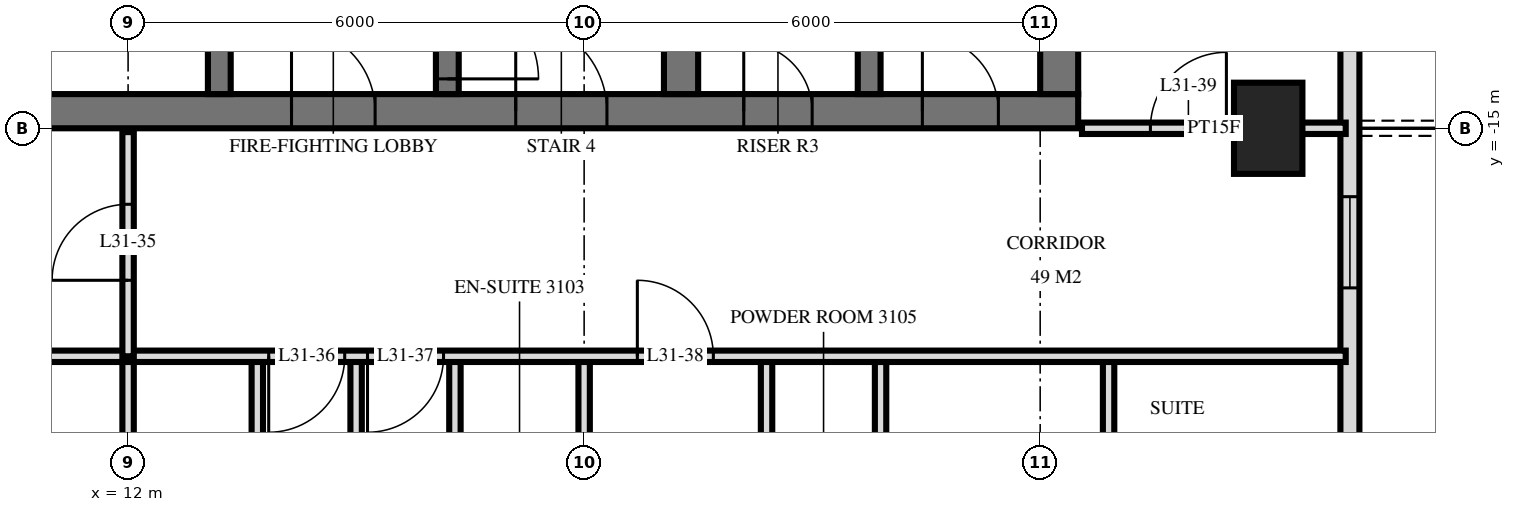
"""IFC4 building model, lengths in metres.
Left out: names, types, materials, properties, quantities, classifications, styles, units other than length and angle.
Written with IfcOpenShell. Run it as: python <this file> out.ifc"""

import sys

from ifc_helpers import new_model, si_unit, direction, frame, frame_2d, origin, origin_2d, place, context, subcontext, project, spatial, rectangle, extrude, element, fill, save


model = new_model("IFC4")
c1 = context("Model", 3, precision=1e-05, world=origin(), true_north=direction((0.0, 1.0)))
c2 = subcontext(c1, "Body", "Model", "MODEL_VIEW")
j1 = project(units=[si_unit("LENGTHUNIT", "METRE"), si_unit("PLANEANGLEUNIT", "RADIAN")], contexts=[c1])
p1 = place(None, origin())
s1 = spatial("IfcSite", under=j1, at=p1, CompositionType="ELEMENT")
p2 = place(p1, origin())
s2 = spatial("IfcBuilding", under=s1, at=p2, CompositionType="ELEMENT")
p3 = place(p2, frame((0.0, 0.0, 123.6)))
s3 = spatial("IfcBuildingStorey", under=s2, at=p3, CompositionType="ELEMENT", Elevation=123.6)
p4 = place(p3, frame((27.0, -15.0, 0.0), z_axis=(0.0, 0.0, 1.0), x_axis=(0.0, 1.0, 0.0)))
e1 = element("IfcColumn", 1, at=p4, inside=s3, PredefinedType="COLUMN", context=c2, shape_type="SweptSolid", body=[
    extrude(rectangle(XDim=1.2, YDim=0.9, at=origin_2d()), origin(), (0.0, 0.0, 1.0), 3.6),
])
p5 = place(p3, frame((10.0, -14.775, 0.0), z_axis=(0.0, 0.0, 1.0), x_axis=(1.0, 0.0, 0.0)))
e2 = element("IfcWall", 2, at=p5, inside=s3, PredefinedType="SHEAR", context=c2, shape_type="SweptSolid", body=[
    extrude(rectangle(XDim=14.5, YDim=0.45, at=frame_2d((7.25, 0.0))), origin(), (0.0, 0.0, 1.0), 3.6),
])
p6 = place(p5, frame((7.1, 0.0, 0.0)))
e3 = element("IfcOpeningElement", 3, at=p6, cuts=e2, PredefinedType="OPENING", context=c2, shape_type="SweptSolid", body=[
    extrude(rectangle(XDim=1.2, YDim=2.1, at=frame_2d((0.6, 1.05))), frame((0.0, 0.235, 0.0), z_axis=(0.0, -1.0, 0.0), x_axis=(1.0, 0.0, 0.0)), (0.0, 0.0, 1.0), 0.47),
])
p7 = place(p5, frame((4.15, 0.0, 0.0)))
e4 = element("IfcOpeningElement", 4, at=p7, cuts=e2, PredefinedType="OPENING", context=c2, shape_type="SweptSolid", body=[
    extrude(rectangle(XDim=1.1, YDim=2.1, at=frame_2d((0.55, 1.05))), frame((0.0, 0.235, 0.0), z_axis=(0.0, -1.0, 0.0), x_axis=(1.0, 0.0, 0.0)), (0.0, 0.0, 1.0), 0.47),
])
p8 = place(p5, frame((10.1, 0.0, 0.0)))
e5 = element("IfcOpeningElement", 5, at=p8, cuts=e2, PredefinedType="OPENING", context=c2, shape_type="SweptSolid", body=[
    extrude(rectangle(XDim=0.9, YDim=2.1, at=frame_2d((0.45, 1.05))), frame((0.0, 0.235, 0.0), z_axis=(0.0, -1.0, 0.0), x_axis=(1.0, 0.0, 0.0)), (0.0, 0.0, 1.0), 0.47),
])
p9 = place(p5, frame((12.45, 0.0, 0.0)))
e6 = element("IfcOpeningElement", 6, at=p9, cuts=e2, PredefinedType="OPENING", context=c2, shape_type="SweptSolid", body=[
    extrude(rectangle(XDim=1.0, YDim=2.1, at=frame_2d((0.5, 1.05))), frame((0.0, 0.235, 0.0), z_axis=(0.0, -1.0, 0.0), x_axis=(1.0, 0.0, 0.0)), (0.0, 0.0, 1.0), 0.47),
])
p10 = place(p3, frame((24.25, -14.55, 0.0), z_axis=(0.0, 0.0, 1.0), x_axis=(0.0, 1.0, 0.0)))
e7 = element("IfcWall", 7, at=p10, inside=s3, PredefinedType="SHEAR", context=c2, shape_type="SweptSolid", body=[
    extrude(rectangle(XDim=14.1, YDim=0.5, at=frame_2d((7.05, 0.0))), origin(), (0.0, 0.0, 1.0), 3.6),
])
p11 = place(p3, frame((13.2, -14.55, 0.0), z_axis=(0.0, 0.0, 1.0), x_axis=(0.0, 1.0, 0.0)))
e8 = element("IfcWall", 8, at=p11, inside=s3, PredefinedType="SHEAR", context=c2, shape_type="SweptSolid", body=[
    extrude(rectangle(XDim=5.4, YDim=0.3, at=frame_2d((2.7, 0.0))), origin(), (0.0, 0.0, 1.0), 3.6),
])
p12 = place(p11, frame((4.0, 0.0, 0.0)))
e9 = element("IfcOpeningElement", 9, at=p12, cuts=e8, PredefinedType="OPENING", context=c2, shape_type="SweptSolid", body=[
    extrude(rectangle(XDim=1.2, YDim=2.1, at=frame_2d((0.6, 1.05))), frame((0.0, 0.16, 0.0), z_axis=(0.0, -1.0, 0.0), x_axis=(1.0, 0.0, 0.0)), (0.0, 0.0, 1.0), 0.32),
])
p13 = place(p3, frame((16.2, -14.55, 0.0), z_axis=(0.0, 0.0, 1.0), x_axis=(0.0, 1.0, 0.0)))
e10 = element("IfcWall", 10, at=p13, inside=s3, PredefinedType="SHEAR", context=c2, shape_type="SweptSolid", body=[
    extrude(rectangle(XDim=5.4, YDim=0.3, at=frame_2d((2.7, 0.0))), origin(), (0.0, 0.0, 1.0), 3.6),
])
p14 = place(p13, frame((0.2, 0.0, 0.0)))
e11 = element("IfcOpeningElement", 11, at=p14, cuts=e10, PredefinedType="OPENING", context=c2, shape_type="SweptSolid", body=[
    extrude(rectangle(XDim=1.2, YDim=2.1, at=frame_2d((0.6, 1.05))), frame((0.0, 0.16, 0.0), z_axis=(0.0, -1.0, 0.0), x_axis=(1.0, 0.0, 0.0)), (0.0, 0.0, 1.0), 0.32),
])
p15 = place(p3, frame((19.275, -14.55, 0.0), z_axis=(0.0, 0.0, 1.0), x_axis=(0.0, 1.0, 0.0)))
e12 = element("IfcWall", 12, at=p15, inside=s3, PredefinedType="SHEAR", context=c2, shape_type="SweptSolid", body=[
    extrude(rectangle(XDim=5.4, YDim=0.45, at=frame_2d((2.7, 0.0))), origin(), (0.0, 0.0, 1.0), 3.6),
])
p16 = place(p3, frame((21.75, -14.55, 0.0), z_axis=(0.0, 0.0, 1.0), x_axis=(0.0, 1.0, 0.0)))
e13 = element("IfcWall", 13, at=p16, inside=s3, PredefinedType="SHEAR", context=c2, shape_type="SweptSolid", body=[
    extrude(rectangle(XDim=5.4, YDim=0.3, at=frame_2d((2.7, 0.0))), origin(), (0.0, 0.0, 1.0), 3.6),
])
p17 = place(p3, frame((28.075, -29.275, 0.0), z_axis=(0.0, 0.0, 1.0), x_axis=(0.0, 1.0, 0.0)))
e14 = element("IfcWall", 14, at=p17, inside=s3, PredefinedType="SOLIDWALL", context=c2, shape_type="SweptSolid", body=[
    extrude(rectangle(XDim=25.951, YDim=0.25, at=frame_2d((12.975, 0.0))), origin(), (0.0, 0.0, 1.0), 3.32),
])
p18 = place(p17, frame((0.575, 0.0, 0.0)))
e15 = element("IfcOpeningElement", 15, at=p18, cuts=e14, PredefinedType="OPENING", context=c2, shape_type="SweptSolid", body=[
    extrude(rectangle(XDim=1.8, YDim=2.4, at=frame_2d((0.9, 1.2))), frame((0.0, 0.135, 0.0), z_axis=(0.0, -1.0, 0.0), x_axis=(1.0, 0.0, 0.0)), (0.0, 0.0, 1.0), 0.27),
])
p19 = place(p17, frame((3.325, 0.0, 0.3)))
e16 = element("IfcOpeningElement", 16, at=p19, cuts=e14, PredefinedType="OPENING", context=c2, shape_type="SweptSolid", body=[
    extrude(rectangle(XDim=1.8, YDim=2.1, at=frame_2d((0.9, 1.05))), frame((0.0, 0.135, 0.0), z_axis=(0.0, -1.0, 0.0), x_axis=(1.0, 0.0, 0.0)), (0.0, 0.0, 1.0), 0.27),
])
p20 = place(p17, frame((8.275, 0.0, 0.0)))
e17 = element("IfcOpeningElement", 17, at=p20, cuts=e14, PredefinedType="OPENING", context=c2, shape_type="SweptSolid", body=[
    extrude(rectangle(XDim=1.8, YDim=2.4, at=frame_2d((0.9, 1.2))), frame((0.0, 0.135, 0.0), z_axis=(0.0, -1.0, 0.0), x_axis=(1.0, 0.0, 0.0)), (0.0, 0.0, 1.0), 0.27),
])
p21 = place(p17, frame((12.175, 0.0, 0.3)))
e18 = element("IfcOpeningElement", 18, at=p21, cuts=e14, PredefinedType="OPENING", context=c2, shape_type="SweptSolid", body=[
    extrude(rectangle(XDim=1.2, YDim=2.1, at=frame_2d((0.6, 1.05))), frame((0.0, 0.135, 0.0), z_axis=(0.0, -1.0, 0.0), x_axis=(1.0, 0.0, 0.0)), (0.0, 0.0, 1.0), 0.27),
])
p22 = place(p17, frame((16.375, 0.0, 0.0)))
e19 = element("IfcOpeningElement", 19, at=p22, cuts=e14, PredefinedType="OPENING", context=c2, shape_type="SweptSolid", body=[
    extrude(rectangle(XDim=1.8, YDim=2.4, at=frame_2d((0.9, 1.2))), frame((0.0, 0.135, 0.0), z_axis=(0.0, -1.0, 0.0), x_axis=(1.0, 0.0, 0.0)), (0.0, 0.0, 1.0), 0.27),
])
p23 = place(p3, frame((24.9, -22.2, 0.0), z_axis=(0.0, 0.0, 1.0), x_axis=(0.0, 1.0, 0.0)))
e20 = element("IfcWall", 20, at=p23, inside=s3, PredefinedType="PARTITIONING", context=c2, shape_type="SweptSolid", body=[
    extrude(rectangle(XDim=4.2, YDim=0.15, at=frame_2d((2.1, 0.0))), origin(), (0.0, 0.0, 1.0), 3.32),
])
p24 = place(p3, frame((21.9, -22.2, 0.0), z_axis=(0.0, 0.0, 1.0), x_axis=(0.0, 1.0, 0.0)))
e21 = element("IfcWall", 21, at=p24, inside=s3, PredefinedType="PLUMBINGWALL", context=c2, shape_type="SweptSolid", body=[
    extrude(rectangle(XDim=4.2, YDim=0.15, at=frame_2d((2.1, 0.0))), origin(), (0.0, 0.0, 1.0), 3.32),
])
p25 = place(p3, frame((20.4, -22.2, 0.0), z_axis=(0.0, 0.0, 1.0), x_axis=(0.0, 1.0, 0.0)))
e22 = element("IfcWall", 22, at=p25, inside=s3, PredefinedType="PARTITIONING", context=c2, shape_type="SweptSolid", body=[
    extrude(rectangle(XDim=4.2, YDim=0.15, at=frame_2d((2.1, 0.0))), origin(), (0.0, 0.0, 1.0), 3.32),
])
p26 = place(p25, frame((1.6, 0.0, 0.0)))
e23 = element("IfcOpeningElement", 23, at=p26, cuts=e22, PredefinedType="OPENING", context=c2, shape_type="SweptSolid", body=[
    extrude(rectangle(XDim=1.0, YDim=2.1, at=frame_2d((0.5, 1.05))), frame((0.0, 0.085, 0.0), z_axis=(0.0, -1.0, 0.0), x_axis=(1.0, 0.0, 0.0)), (0.0, 0.0, 1.0), 0.17),
])
p27 = place(p3, frame((18.0, -22.2, 0.0), z_axis=(0.0, 0.0, 1.0), x_axis=(0.0, 1.0, 0.0)))
e24 = element("IfcWall", 24, at=p27, inside=s3, PredefinedType="PARTITIONING", context=c2, shape_type="SweptSolid", body=[
    extrude(rectangle(XDim=4.2, YDim=0.15, at=frame_2d((2.1, 0.0))), origin(), (0.0, 0.0, 1.0), 3.32),
])
p28 = place(p3, frame((16.3, -23.0, 0.0), z_axis=(0.0, 0.0, 1.0), x_axis=(0.0, 1.0, 0.0)))
e25 = element("IfcWall", 25, at=p28, inside=s3, PredefinedType="PARTITIONING", context=c2, shape_type="SweptSolid", body=[
    extrude(rectangle(XDim=5.0, YDim=0.15, at=frame_2d((2.5, 0.0))), origin(), (0.0, 0.0, 1.0), 3.32),
])
p29 = place(p28, frame((2.12, 0.0, 0.0)))
e26 = element("IfcOpeningElement", 26, at=p29, cuts=e25, PredefinedType="OPENING", context=c2, shape_type="SweptSolid", body=[
    extrude(rectangle(XDim=0.8, YDim=2.1, at=frame_2d((0.4, 1.05))), frame((0.0, 0.085, 0.0), z_axis=(0.0, -1.0, 0.0), x_axis=(1.0, 0.0, 0.0)), (0.0, 0.0, 1.0), 0.17),
])
p30 = place(p3, frame((15.0, -33.62, 0.0), z_axis=(0.0, 0.0, 1.0), x_axis=(0.0, 1.0, 0.0)))
e27 = element("IfcWall", 27, at=p30, inside=s3, PredefinedType="PARTITIONING", context=c2, shape_type="SweptSolid", body=[
    extrude(rectangle(XDim=15.62, YDim=0.15, at=frame_2d((7.81, 0.0))), origin(), (0.0, 0.0, 1.0), 3.32),
])
p31 = place(p3, frame((13.7, -23.0, 0.0), z_axis=(0.0, 0.0, 1.0), x_axis=(0.0, 1.0, 0.0)))
e28 = element("IfcWall", 28, at=p31, inside=s3, PredefinedType="PARTITIONING", context=c2, shape_type="SweptSolid", body=[
    extrude(rectangle(XDim=5.0, YDim=0.15, at=frame_2d((2.5, 0.0))), origin(), (0.0, 0.0, 1.0), 3.32),
])
p32 = place(p31, frame((2.08, 0.0, 0.0)))
e29 = element("IfcOpeningElement", 29, at=p32, cuts=e28, PredefinedType="OPENING", context=c2, shape_type="SweptSolid", body=[
    extrude(rectangle(XDim=0.8, YDim=2.1, at=frame_2d((0.4, 1.05))), frame((0.0, 0.085, 0.0), z_axis=(0.0, -1.0, 0.0), x_axis=(1.0, 0.0, 0.0)), (0.0, 0.0, 1.0), 0.17),
])
p33 = place(p3, frame((12.0, -18.0, 0.0), z_axis=(0.0, 0.0, 1.0), x_axis=(0.0, 1.0, 0.0)))
e30 = element("IfcWall", 30, at=p33, inside=s3, PredefinedType="PARTITIONING", context=c2, shape_type="SweptSolid", body=[
    extrude(rectangle(XDim=2.95, YDim=0.15, at=frame_2d((1.475, 0.0))), origin(), (0.0, 0.0, 1.0), 3.32),
])
p34 = place(p33, frame((1.0, 0.0, 0.0)))
e31 = element("IfcOpeningElement", 31, at=p34, cuts=e30, PredefinedType="OPENING", context=c2, shape_type="SweptSolid", body=[
    extrude(rectangle(XDim=1.0, YDim=2.1, at=frame_2d((0.5, 1.05))), frame((0.0, 0.085, 0.0), z_axis=(0.0, -1.0, 0.0), x_axis=(1.0, 0.0, 0.0)), (0.0, 0.0, 1.0), 0.17),
])
p35 = place(p3, frame((12.0, -33.62, 0.0), z_axis=(0.0, 0.0, 1.0), x_axis=(0.0, 1.0, 0.0)))
e32 = element("IfcWall", 32, at=p35, inside=s3, PredefinedType="PARTITIONING", context=c2, shape_type="SweptSolid", body=[
    extrude(rectangle(XDim=15.62, YDim=0.15, at=frame_2d((7.81, 0.0))), origin(), (0.0, 0.0, 1.0), 3.32),
])
p36 = place(p3, frame((-28.02, -18.0, 0.0), z_axis=(0.0, 0.0, 1.0), x_axis=(1.0, 0.0, 0.0)))
e33 = element("IfcWall", 33, at=p36, inside=s3, PredefinedType="PARTITIONING", context=c2, shape_type="SweptSolid", body=[
    extrude(rectangle(XDim=56.04, YDim=0.15, at=frame_2d((28.02, 0.0))), origin(), (0.0, 0.0, 1.0), 3.32),
])
p37 = place(p36, frame((13.17, 0.0, 0.0)))
e34 = element("IfcOpeningElement", 34, at=p37, cuts=e33, PredefinedType="OPENING", context=c2, shape_type="SweptSolid", body=[
    extrude(rectangle(XDim=1.0, YDim=2.1, at=frame_2d((0.5, 1.05))), frame((0.0, 0.085, 0.0), z_axis=(0.0, -1.0, 0.0), x_axis=(1.0, 0.0, 0.0)), (0.0, 0.0, 1.0), 0.17),
])
p38 = place(p36, frame((11.32, 0.0, 0.0)))
e35 = element("IfcOpeningElement", 35, at=p38, cuts=e33, PredefinedType="OPENING", context=c2, shape_type="SweptSolid", body=[
    extrude(rectangle(XDim=1.0, YDim=2.1, at=frame_2d((0.5, 1.05))), frame((0.0, 0.085, 0.0), z_axis=(0.0, -1.0, 0.0), x_axis=(1.0, 0.0, 0.0)), (0.0, 0.0, 1.0), 0.17),
])
p39 = place(p36, frame((41.87, 0.0, 0.0)))
e36 = element("IfcOpeningElement", 36, at=p39, cuts=e33, PredefinedType="OPENING", context=c2, shape_type="SweptSolid", body=[
    extrude(rectangle(XDim=1.0, YDim=2.1, at=frame_2d((0.5, 1.05))), frame((0.0, 0.085, 0.0), z_axis=(0.0, -1.0, 0.0), x_axis=(1.0, 0.0, 0.0)), (0.0, 0.0, 1.0), 0.17),
])
p40 = place(p36, frame((43.17, 0.0, 0.0)))
e37 = element("IfcOpeningElement", 37, at=p40, cuts=e33, PredefinedType="OPENING", context=c2, shape_type="SweptSolid", body=[
    extrude(rectangle(XDim=1.0, YDim=2.1, at=frame_2d((0.5, 1.05))), frame((0.0, 0.085, 0.0), z_axis=(0.0, -1.0, 0.0), x_axis=(1.0, 0.0, 0.0)), (0.0, 0.0, 1.0), 0.17),
])
p41 = place(p36, frame((46.72, 0.0, 0.0)))
e38 = element("IfcOpeningElement", 38, at=p41, cuts=e33, PredefinedType="OPENING", context=c2, shape_type="SweptSolid", body=[
    extrude(rectangle(XDim=1.0, YDim=2.1, at=frame_2d((0.5, 1.05))), frame((0.0, 0.085, 0.0), z_axis=(0.0, -1.0, 0.0), x_axis=(1.0, 0.0, 0.0)), (0.0, 0.0, 1.0), 0.17),
])
p42 = place(p36, frame((21.52, 0.0, 0.0)))
e39 = element("IfcOpeningElement", 39, at=p42, cuts=e33, PredefinedType="OPENING", context=c2, shape_type="SweptSolid", body=[
    extrude(rectangle(XDim=1.0, YDim=2.1, at=frame_2d((0.5, 1.05))), frame((0.0, 0.085, 0.0), z_axis=(0.0, -1.0, 0.0), x_axis=(1.0, 0.0, 0.0)), (0.0, 0.0, 1.0), 0.17),
])
p43 = place(p36, frame((33.52, 0.0, 0.0)))
e40 = element("IfcOpeningElement", 40, at=p43, cuts=e33, PredefinedType="OPENING", context=c2, shape_type="SweptSolid", body=[
    extrude(rectangle(XDim=1.0, YDim=2.1, at=frame_2d((0.5, 1.05))), frame((0.0, 0.085, 0.0), z_axis=(0.0, -1.0, 0.0), x_axis=(1.0, 0.0, 0.0)), (0.0, 0.0, 1.0), 0.17),
])
p44 = place(p3, frame((24.55, -15.0, 0.0), z_axis=(0.0, 0.0, 1.0), x_axis=(1.0, 0.0, 0.0)))
e41 = element("IfcWall", 41, at=p44, inside=s3, PredefinedType="PARTITIONING", context=c2, shape_type="SweptSolid", body=[
    extrude(rectangle(XDim=3.47, YDim=0.15, at=frame_2d((1.735, 0.0))), origin(), (0.0, 0.0, 1.0), 3.32),
])
p45 = place(p44, frame((0.9, 0.0, 0.0)))
e42 = element("IfcOpeningElement", 42, at=p45, cuts=e41, PredefinedType="OPENING", context=c2, shape_type="SweptSolid", body=[
    extrude(rectangle(XDim=1.0, YDim=2.1, at=frame_2d((0.5, 1.05))), frame((0.0, 0.085, 0.0), z_axis=(0.0, -1.0, 0.0), x_axis=(1.0, 0.0, 0.0)), (0.0, 0.0, 1.0), 0.17),
])
p46 = place(p21, origin())
e43 = element("IfcWindow", 43, at=p46, inside=s3, PartitioningType="SINGLE_PANEL", PredefinedType="WINDOW", context=c2, shape_type="SweptSolid", body=[
    extrude(rectangle(XDim=1.2, YDim=2.1, at=frame_2d((0.6, 1.05))), frame((0.0, 0.03, 0.0), z_axis=(0.0, -1.0, 0.0), x_axis=(1.0, 0.0, 0.0)), (0.0, 0.0, 1.0), 0.06),
])
fill(e18, e43)
p47 = place(p6, origin())
e44 = element("IfcDoor", 44, at=p47, inside=s3, OperationType="SINGLE_SWING_RIGHT", PredefinedType="DOOR", context=c2, shape_type="SweptSolid", body=[
    extrude(rectangle(XDim=1.2, YDim=2.1, at=frame_2d((0.6, 1.05))), frame((0.0, 0.025, 0.0), z_axis=(0.0, -1.0, 0.0), x_axis=(1.0, 0.0, 0.0)), (0.0, 0.0, 1.0), 0.05),
])
fill(e3, e44)
p48 = place(p7, origin())
e45 = element("IfcDoor", 45, at=p48, inside=s3, OperationType="SINGLE_SWING_RIGHT", PredefinedType="DOOR", context=c2, shape_type="SweptSolid", body=[
    extrude(rectangle(XDim=1.1, YDim=2.1, at=frame_2d((0.55, 1.05))), frame((0.0, 0.025, 0.0), z_axis=(0.0, -1.0, 0.0), x_axis=(1.0, 0.0, 0.0)), (0.0, 0.0, 1.0), 0.05),
])
fill(e4, e45)
p49 = place(p8, origin())
e46 = element("IfcDoor", 46, at=p49, inside=s3, OperationType="SINGLE_SWING_RIGHT", PredefinedType="DOOR", context=c2, shape_type="SweptSolid", body=[
    extrude(rectangle(XDim=0.9, YDim=2.1, at=frame_2d((0.45, 1.05))), frame((0.0, 0.025, 0.0), z_axis=(0.0, -1.0, 0.0), x_axis=(1.0, 0.0, 0.0)), (0.0, 0.0, 1.0), 0.05),
])
fill(e5, e46)
p50 = place(p9, origin())
e47 = element("IfcDoor", 47, at=p50, inside=s3, OperationType="SINGLE_SWING_RIGHT", PredefinedType="DOOR", context=c2, shape_type="SweptSolid", body=[
    extrude(rectangle(XDim=1.0, YDim=2.1, at=frame_2d((0.5, 1.05))), frame((0.0, 0.025, 0.0), z_axis=(0.0, -1.0, 0.0), x_axis=(1.0, 0.0, 0.0)), (0.0, 0.0, 1.0), 0.05),
])
fill(e6, e47)
p51 = place(p14, frame((0.6, 0.0, 0.0), z_axis=(0.0, 0.0, 1.0), x_axis=(-1.0, 0.0, 0.0)))
e48 = element("IfcDoor", 48, at=p51, inside=s3, OperationType="SINGLE_SWING_LEFT", PredefinedType="DOOR", context=c2, shape_type="SweptSolid", body=[
    extrude(rectangle(XDim=1.2, YDim=2.1, at=frame_2d((0.0, 1.05))), frame((0.0, -0.025, 0.0), z_axis=(0.0, 1.0, 0.0), x_axis=(-1.0, 0.0, 0.0)), (0.0, 0.0, 1.0), 0.05),
])
fill(e11, e48)
p52 = place(p34, origin())
e49 = element("IfcDoor", 49, at=p52, inside=s3, OperationType="SINGLE_SWING_RIGHT", PredefinedType="DOOR", context=c2, shape_type="SweptSolid", body=[
    extrude(rectangle(XDim=1.0, YDim=2.1, at=frame_2d((0.5, 1.05))), frame((0.0, 0.025, 0.0), z_axis=(0.0, -1.0, 0.0), x_axis=(1.0, 0.0, 0.0)), (0.0, 0.0, 1.0), 0.05),
])
fill(e31, e49)
p53 = place(p39, frame((0.5, 0.0, 0.0), z_axis=(0.0, 0.0, 1.0), x_axis=(-1.0, 0.0, 0.0)))
e50 = element("IfcDoor", 50, at=p53, inside=s3, OperationType="SINGLE_SWING_LEFT", PredefinedType="DOOR", context=c2, shape_type="SweptSolid", body=[
    extrude(rectangle(XDim=1.0, YDim=2.1, at=frame_2d((0.0, 1.05))), frame((0.0, -0.025, 0.0), z_axis=(0.0, 1.0, 0.0), x_axis=(-1.0, 0.0, 0.0)), (0.0, 0.0, 1.0), 0.05),
])
fill(e36, e50)
p54 = place(p40, frame((0.5, 0.0, 0.0), z_axis=(0.0, 0.0, 1.0), x_axis=(-1.0, 0.0, 0.0)))
e51 = element("IfcDoor", 51, at=p54, inside=s3, OperationType="SINGLE_SWING_LEFT", PredefinedType="DOOR", context=c2, shape_type="SweptSolid", body=[
    extrude(rectangle(XDim=1.0, YDim=2.1, at=frame_2d((0.0, 1.05))), frame((0.0, -0.025, 0.0), z_axis=(0.0, 1.0, 0.0), x_axis=(-1.0, 0.0, 0.0)), (0.0, 0.0, 1.0), 0.05),
])
fill(e37, e51)
p55 = place(p41, origin())
e52 = element("IfcDoor", 52, at=p55, inside=s3, OperationType="SINGLE_SWING_RIGHT", PredefinedType="DOOR", context=c2, shape_type="SweptSolid", body=[
    extrude(rectangle(XDim=1.0, YDim=2.1, at=frame_2d((0.5, 1.05))), frame((0.0, 0.025, 0.0), z_axis=(0.0, -1.0, 0.0), x_axis=(1.0, 0.0, 0.0)), (0.0, 0.0, 1.0), 0.05),
])
fill(e38, e52)
p56 = place(p45, origin())
e53 = element("IfcDoor", 53, at=p56, inside=s3, OperationType="SINGLE_SWING_LEFT", PredefinedType="DOOR", context=c2, shape_type="SweptSolid", body=[
    extrude(rectangle(XDim=1.0, YDim=2.1, at=frame_2d((0.5, 1.05))), frame((0.0, 0.025, 0.0), z_axis=(0.0, -1.0, 0.0), x_axis=(1.0, 0.0, 0.0)), (0.0, 0.0, 1.0), 0.05),
])
fill(e42, e53)
save(model, sys.argv[1])
